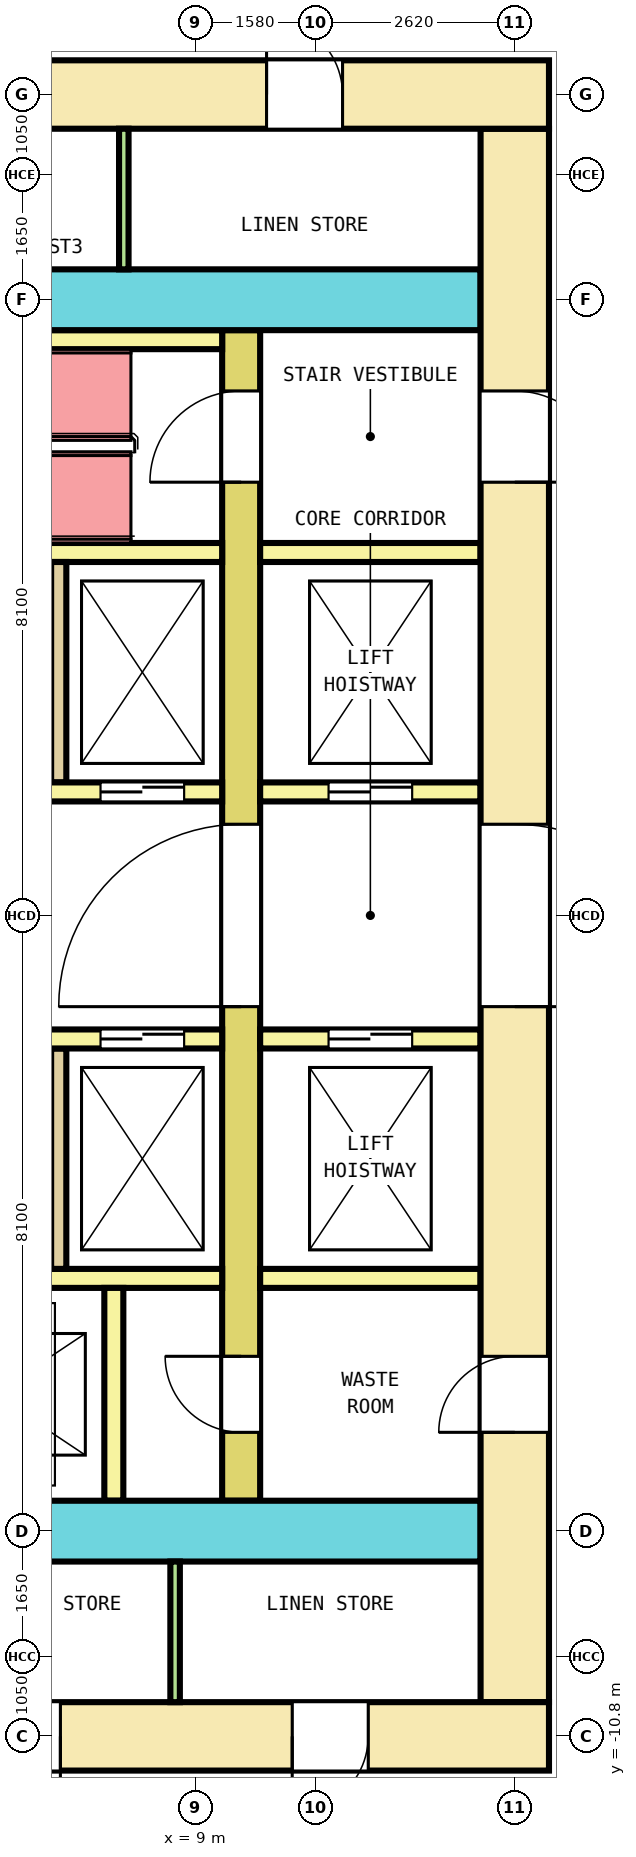
"""IFC4 building model, lengths in metres.
Left out: names, types, materials, properties, quantities, classifications, styles, units other than length and angle.
Written with IfcOpenShell. Run it as: python <this file> out.ifc"""

import sys

from ifc_helpers import new_model, si_unit, direction, frame, frame_2d, origin, place, context, subcontext, project, spatial, rectangle, extrude, element, fill, save


model = new_model("IFC4")
c1 = context("Model", 3, precision=1e-05, world=origin(), true_north=direction((0.0, 1.0)))
c2 = subcontext(c1, "Body", "Model", "MODEL_VIEW")
j1 = project(units=[si_unit("LENGTHUNIT", "METRE"), si_unit("PLANEANGLEUNIT", "RADIAN")], contexts=[c1])
p1 = place(None, origin())
s1 = spatial("IfcSite", under=j1, at=p1, CompositionType="ELEMENT")
p2 = place(p1, origin())
s2 = spatial("IfcBuilding", under=s1, at=p2, CompositionType="ELEMENT")
p3 = place(p2, frame((0.0, 0.0, 67.4)))
s3 = spatial("IfcBuildingStorey", under=s2, at=p3, CompositionType="ELEMENT", Elevation=67.4)
p4 = place(p3, frame((-13.65, 10.8, 0.0), z_axis=(0.0, 0.0, 1.0), x_axis=(1.0, 0.0, 0.0)))
e1 = element("IfcWall", 1, at=p4, inside=s3, PredefinedType="SHEAR", context=c2, shape_type="SweptSolid", body=[
    extrude(rectangle(XDim=27.3, YDim=0.9, at=frame_2d((13.65, 0.0))), origin(), (0.0, 0.0, 1.0), 4.1),
])
p5 = place(p4, frame((3.416, 0.0, 0.0)))
e2 = element("IfcOpeningElement", 2, at=p5, cuts=e1, PredefinedType="OPENING", context=c2, shape_type="SweptSolid", body=[
    extrude(rectangle(XDim=1.0, YDim=2.1, at=frame_2d((0.5, 1.05))), frame((0.0, 0.46, 0.0), z_axis=(0.0, -1.0, 0.0), x_axis=(1.0, 0.0, 0.0)), (0.0, 0.0, 1.0), 0.92),
])
p6 = place(p4, frame((9.541, 0.0, 0.0)))
e3 = element("IfcOpeningElement", 3, at=p6, cuts=e1, PredefinedType="OPENING", context=c2, shape_type="SweptSolid", body=[
    extrude(rectangle(XDim=1.0, YDim=2.1, at=frame_2d((0.5, 1.05))), frame((0.0, 0.46, 0.0), z_axis=(0.0, -1.0, 0.0), x_axis=(1.0, 0.0, 0.0)), (0.0, 0.0, 1.0), 0.92),
])
p7 = place(p4, frame((18.859, 0.0, 0.0)))
e4 = element("IfcOpeningElement", 4, at=p7, cuts=e1, PredefinedType="OPENING", context=c2, shape_type="SweptSolid", body=[
    extrude(rectangle(XDim=1.0, YDim=2.1, at=frame_2d((0.5, 1.05))), frame((0.0, 0.46, 0.0), z_axis=(0.0, -1.0, 0.0), x_axis=(1.0, 0.0, 0.0)), (0.0, 0.0, 1.0), 0.92),
])
p8 = place(p4, frame((23.584, 0.0, 0.0)))
e5 = element("IfcOpeningElement", 5, at=p8, cuts=e1, PredefinedType="OPENING", context=c2, shape_type="SweptSolid", body=[
    extrude(rectangle(XDim=1.0, YDim=2.1, at=frame_2d((0.5, 1.05))), frame((0.0, 0.46, 0.0), z_axis=(0.0, -1.0, 0.0), x_axis=(1.0, 0.0, 0.0)), (0.0, 0.0, 1.0), 0.92),
])
p9 = place(p4, frame((14.575, 0.0, 0.0)))
e6 = element("IfcOpeningElement", 6, at=p9, cuts=e1, PredefinedType="OPENING", context=c2, shape_type="SweptSolid", body=[
    extrude(rectangle(XDim=1.4, YDim=2.1, at=frame_2d((0.7, 1.05))), frame((0.0, 0.46, 0.0), z_axis=(0.0, -1.0, 0.0), x_axis=(1.0, 0.0, 0.0)), (0.0, 0.0, 1.0), 0.92),
])
p10 = place(p3, frame((-13.65, -10.8, 0.0), z_axis=(0.0, 0.0, 1.0), x_axis=(1.0, 0.0, 0.0)))
e7 = element("IfcWall", 7, at=p10, inside=s3, PredefinedType="SHEAR", context=c2, shape_type="SweptSolid", body=[
    extrude(rectangle(XDim=27.3, YDim=0.9, at=frame_2d((13.65, 0.0))), origin(), (0.0, 0.0, 1.0), 4.1),
])
p11 = place(p10, frame((2.425, 0.0, 0.0)))
e8 = element("IfcOpeningElement", 8, at=p11, cuts=e7, PredefinedType="OPENING", context=c2, shape_type="SweptSolid", body=[
    extrude(rectangle(XDim=1.0, YDim=2.1, at=frame_2d((0.5, 1.05))), frame((0.0, 0.46, 0.0), z_axis=(0.0, -1.0, 0.0), x_axis=(1.0, 0.0, 0.0)), (0.0, 0.0, 1.0), 0.92),
])
p12 = place(p10, frame((6.569, 0.0, 0.0)))
e9 = element("IfcOpeningElement", 9, at=p12, cuts=e7, PredefinedType="OPENING", context=c2, shape_type="SweptSolid", body=[
    extrude(rectangle(XDim=1.0, YDim=2.1, at=frame_2d((0.5, 1.05))), frame((0.0, 0.46, 0.0), z_axis=(0.0, -1.0, 0.0), x_axis=(1.0, 0.0, 0.0)), (0.0, 0.0, 1.0), 0.92),
])
p13 = place(p10, frame((10.681, 0.0, 0.0)))
e10 = element("IfcOpeningElement", 10, at=p13, cuts=e7, PredefinedType="OPENING", context=c2, shape_type="SweptSolid", body=[
    extrude(rectangle(XDim=1.0, YDim=2.1, at=frame_2d((0.5, 1.05))), frame((0.0, 0.46, 0.0), z_axis=(0.0, -1.0, 0.0), x_axis=(1.0, 0.0, 0.0)), (0.0, 0.0, 1.0), 0.92),
])
p14 = place(p10, frame((19.872, 0.0, 0.0)))
e11 = element("IfcOpeningElement", 11, at=p14, cuts=e7, PredefinedType="OPENING", context=c2, shape_type="SweptSolid", body=[
    extrude(rectangle(XDim=1.0, YDim=2.1, at=frame_2d((0.5, 1.05))), frame((0.0, 0.46, 0.0), z_axis=(0.0, -1.0, 0.0), x_axis=(1.0, 0.0, 0.0)), (0.0, 0.0, 1.0), 0.92),
])
p15 = place(p10, frame((23.922, 0.0, 0.0)))
e12 = element("IfcOpeningElement", 12, at=p15, cuts=e7, PredefinedType="OPENING", context=c2, shape_type="SweptSolid", body=[
    extrude(rectangle(XDim=1.0, YDim=2.1, at=frame_2d((0.5, 1.05))), frame((0.0, 0.46, 0.0), z_axis=(0.0, -1.0, 0.0), x_axis=(1.0, 0.0, 0.0)), (0.0, 0.0, 1.0), 0.92),
])
p16 = place(p10, frame((15.2, 0.0, 0.0)))
e13 = element("IfcOpeningElement", 13, at=p16, cuts=e7, PredefinedType="OPENING", context=c2, shape_type="SweptSolid", body=[
    extrude(rectangle(XDim=1.2, YDim=2.1, at=frame_2d((0.6, 1.05))), frame((0.0, 0.46, 0.0), z_axis=(0.0, -1.0, 0.0), x_axis=(1.0, 0.0, 0.0)), (0.0, 0.0, 1.0), 0.92),
])
p17 = place(p3, frame((13.2, -10.35, 0.0), z_axis=(0.0, 0.0, 1.0), x_axis=(0.0, 1.0, 0.0)))
e14 = element("IfcWall", 14, at=p17, inside=s3, PredefinedType="SHEAR", context=c2, shape_type="SweptSolid", body=[
    extrude(rectangle(XDim=20.7, YDim=0.9, at=frame_2d((10.35, 0.0))), origin(), (0.0, 0.0, 1.0), 4.1),
])
p18 = place(p17, frame((9.15, 0.0, 0.0)))
e15 = element("IfcOpeningElement", 15, at=p18, cuts=e14, PredefinedType="OPENING", context=c2, shape_type="SweptSolid", body=[
    extrude(rectangle(XDim=2.4, YDim=2.1, at=frame_2d((1.2, 1.05))), frame((0.0, 0.46, 0.0), z_axis=(0.0, -1.0, 0.0), x_axis=(1.0, 0.0, 0.0)), (0.0, 0.0, 1.0), 0.92),
])
p19 = place(p17, frame((16.05, 0.0, 0.0)))
e16 = element("IfcOpeningElement", 16, at=p19, cuts=e14, PredefinedType="OPENING", context=c2, shape_type="SweptSolid", body=[
    extrude(rectangle(XDim=1.2, YDim=2.1, at=frame_2d((0.6, 1.05))), frame((0.0, 0.46, 0.0), z_axis=(0.0, -1.0, 0.0), x_axis=(1.0, 0.0, 0.0)), (0.0, 0.0, 1.0), 0.92),
])
p20 = place(p17, frame((3.55, 0.0, 0.0)))
e17 = element("IfcOpeningElement", 17, at=p20, cuts=e14, PredefinedType="OPENING", context=c2, shape_type="SweptSolid", body=[
    extrude(rectangle(XDim=1.0, YDim=2.1, at=frame_2d((0.5, 1.05))), frame((0.0, 0.46, 0.0), z_axis=(0.0, -1.0, 0.0), x_axis=(1.0, 0.0, 0.0)), (0.0, 0.0, 1.0), 0.92),
])
p21 = place(p3, frame((-12.75, 8.1, 0.0), z_axis=(0.0, 0.0, 1.0), x_axis=(1.0, 0.0, 0.0)))
e18 = element("IfcWall", 18, at=p21, inside=s3, PredefinedType="SHEAR", context=c2, shape_type="SweptSolid", body=[
    extrude(rectangle(XDim=25.5, YDim=0.8, at=frame_2d((12.75, 0.0))), origin(), (0.0, 0.0, 1.0), 4.1),
])
p22 = place(p21, frame((13.675, 0.0, 0.0)))
e19 = element("IfcOpeningElement", 19, at=p22, cuts=e18, PredefinedType="OPENING", context=c2, shape_type="SweptSolid", body=[
    extrude(rectangle(XDim=1.4, YDim=2.1, at=frame_2d((0.7, 1.05))), frame((0.0, 0.41, 0.0), z_axis=(0.0, -1.0, 0.0), x_axis=(1.0, 0.0, 0.0)), (0.0, 0.0, 1.0), 0.82),
])
p23 = place(p3, frame((-12.75, -8.1, 0.0), z_axis=(0.0, 0.0, 1.0), x_axis=(1.0, 0.0, 0.0)))
e20 = element("IfcWall", 20, at=p23, inside=s3, PredefinedType="SHEAR", context=c2, shape_type="SweptSolid", body=[
    extrude(rectangle(XDim=25.5, YDim=0.8, at=frame_2d((12.75, 0.0))), origin(), (0.0, 0.0, 1.0), 4.1),
])
p24 = place(p23, frame((14.3, 0.0, 0.0)))
e21 = element("IfcOpeningElement", 21, at=p24, cuts=e20, PredefinedType="OPENING", context=c2, shape_type="SweptSolid", body=[
    extrude(rectangle(XDim=1.2, YDim=2.1, at=frame_2d((0.6, 1.05))), frame((0.0, 0.41, 0.0), z_axis=(0.0, -1.0, 0.0), x_axis=(1.0, 0.0, 0.0)), (0.0, 0.0, 1.0), 0.82),
])
p25 = place(p3, frame((9.6, -7.7, 0.0), z_axis=(0.0, 0.0, 1.0), x_axis=(0.0, 1.0, 0.0)))
e22 = element("IfcWall", 22, at=p25, inside=s3, PredefinedType="SHEAR", context=c2, shape_type="SweptSolid", body=[
    extrude(rectangle(XDim=15.4, YDim=0.5, at=frame_2d((7.7, 0.0))), origin(), (0.0, 0.0, 1.0), 4.1),
])
p26 = place(p25, frame((6.5, 0.0, 0.0)))
e23 = element("IfcOpeningElement", 23, at=p26, cuts=e22, PredefinedType="OPENING", context=c2, shape_type="SweptSolid", body=[
    extrude(rectangle(XDim=2.4, YDim=2.1, at=frame_2d((1.2, 1.05))), frame((0.0, 0.26, 0.0), z_axis=(0.0, -1.0, 0.0), x_axis=(1.0, 0.0, 0.0)), (0.0, 0.0, 1.0), 0.52),
])
p27 = place(p25, frame((13.4, 0.0, 0.0)))
e24 = element("IfcOpeningElement", 24, at=p27, cuts=e22, PredefinedType="OPENING", context=c2, shape_type="SweptSolid", body=[
    extrude(rectangle(XDim=1.2, YDim=2.1, at=frame_2d((0.6, 1.05))), frame((0.0, 0.26, 0.0), z_axis=(0.0, -1.0, 0.0), x_axis=(1.0, 0.0, 0.0)), (0.0, 0.0, 1.0), 0.52),
])
p28 = place(p25, frame((0.9, 0.0, 0.0)))
e25 = element("IfcOpeningElement", 25, at=p28, cuts=e22, PredefinedType="OPENING", context=c2, shape_type="SweptSolid", body=[
    extrude(rectangle(XDim=1.0, YDim=2.1, at=frame_2d((0.5, 1.05))), frame((0.0, 0.26, 0.0), z_axis=(0.0, -1.0, 0.0), x_axis=(1.0, 0.0, 0.0)), (0.0, 0.0, 1.0), 0.52),
])
p29 = place(p3, frame((-9.35, 1.625, 0.0), z_axis=(0.0, 0.0, 1.0), x_axis=(1.0, 0.0, 0.0)))
e26 = element("IfcWall", 26, at=p29, inside=s3, PredefinedType="SOLIDWALL", context=c2, shape_type="SweptSolid", body=[
    extrude(rectangle(XDim=18.7, YDim=0.25, at=frame_2d((9.35, 0.0))), origin(), (0.0, 0.0, 1.0), 4.1),
])
p30 = place(p29, frame((0.5, 0.0, 0.0)))
e27 = element("IfcOpeningElement", 27, at=p30, cuts=e26, PredefinedType="OPENING", context=c2, shape_type="SweptSolid", body=[
    extrude(rectangle(XDim=1.1, YDim=2.1, at=frame_2d((0.55, 1.05))), frame((0.0, 0.135, 0.0), z_axis=(0.0, -1.0, 0.0), x_axis=(1.0, 0.0, 0.0)), (0.0, 0.0, 1.0), 0.27),
])
p31 = place(p29, frame((17.1, 0.0, 0.0)))
e28 = element("IfcOpeningElement", 28, at=p31, cuts=e26, PredefinedType="OPENING", context=c2, shape_type="SweptSolid", body=[
    extrude(rectangle(XDim=1.1, YDim=2.1, at=frame_2d((0.55, 1.05))), frame((0.0, 0.135, 0.0), z_axis=(0.0, -1.0, 0.0), x_axis=(1.0, 0.0, 0.0)), (0.0, 0.0, 1.0), 0.27),
])
p32 = place(p3, frame((9.85, 1.625, 0.0), z_axis=(0.0, 0.0, 1.0), x_axis=(1.0, 0.0, 0.0)))
e29 = element("IfcWall", 29, at=p32, inside=s3, PredefinedType="SOLIDWALL", context=c2, shape_type="SweptSolid", body=[
    extrude(rectangle(XDim=2.9, YDim=0.25, at=frame_2d((1.45, 0.0))), origin(), (0.0, 0.0, 1.0), 4.1),
])
p33 = place(p32, frame((0.9, 0.0, 0.0)))
e30 = element("IfcOpeningElement", 30, at=p33, cuts=e29, PredefinedType="OPENING", context=c2, shape_type="SweptSolid", body=[
    extrude(rectangle(XDim=1.1, YDim=2.1, at=frame_2d((0.55, 1.05))), frame((0.0, 0.135, 0.0), z_axis=(0.0, -1.0, 0.0), x_axis=(1.0, 0.0, 0.0)), (0.0, 0.0, 1.0), 0.27),
])
p34 = place(p3, frame((-9.35, 4.775, 0.0), z_axis=(0.0, 0.0, 1.0), x_axis=(1.0, 0.0, 0.0)))
e31 = element("IfcWall", 31, at=p34, inside=s3, PredefinedType="SOLIDWALL", context=c2, shape_type="SweptSolid", body=[
    extrude(rectangle(XDim=18.7, YDim=0.25, at=frame_2d((9.35, 0.0))), origin(), (0.0, 0.0, 1.0), 4.1),
])
p35 = place(p3, frame((9.85, 4.775, 0.0), z_axis=(0.0, 0.0, 1.0), x_axis=(1.0, 0.0, 0.0)))
e32 = element("IfcWall", 32, at=p35, inside=s3, PredefinedType="SOLIDWALL", context=c2, shape_type="SweptSolid", body=[
    extrude(rectangle(XDim=2.9, YDim=0.25, at=frame_2d((1.45, 0.0))), origin(), (0.0, 0.0, 1.0), 4.1),
])
p36 = place(p3, frame((7.2, 1.75, 0.0), z_axis=(0.0, 0.0, 1.0), x_axis=(0.0, 1.0, 0.0)))
e33 = element("IfcWall", 33, at=p36, inside=s3, PredefinedType="SOLIDWALL", context=c2, shape_type="SweptSolid", body=[
    extrude(rectangle(XDim=2.9, YDim=0.2, at=frame_2d((1.45, 0.0))), origin(), (0.0, 0.0, 1.0), 4.1),
])
p37 = place(p3, frame((-9.35, -1.625, 0.0), z_axis=(0.0, 0.0, 1.0), x_axis=(1.0, 0.0, 0.0)))
e34 = element("IfcWall", 34, at=p37, inside=s3, PredefinedType="SOLIDWALL", context=c2, shape_type="SweptSolid", body=[
    extrude(rectangle(XDim=18.7, YDim=0.25, at=frame_2d((9.35, 0.0))), origin(), (0.0, 0.0, 1.0), 4.1),
])
p38 = place(p37, frame((0.5, 0.0, 0.0)))
e35 = element("IfcOpeningElement", 35, at=p38, cuts=e34, PredefinedType="OPENING", context=c2, shape_type="SweptSolid", body=[
    extrude(rectangle(XDim=1.1, YDim=2.1, at=frame_2d((0.55, 1.05))), frame((0.0, 0.135, 0.0), z_axis=(0.0, -1.0, 0.0), x_axis=(1.0, 0.0, 0.0)), (0.0, 0.0, 1.0), 0.27),
])
p39 = place(p37, frame((17.1, 0.0, 0.0)))
e36 = element("IfcOpeningElement", 36, at=p39, cuts=e34, PredefinedType="OPENING", context=c2, shape_type="SweptSolid", body=[
    extrude(rectangle(XDim=1.1, YDim=2.1, at=frame_2d((0.55, 1.05))), frame((0.0, 0.135, 0.0), z_axis=(0.0, -1.0, 0.0), x_axis=(1.0, 0.0, 0.0)), (0.0, 0.0, 1.0), 0.27),
])
p40 = place(p3, frame((9.85, -1.625, 0.0), z_axis=(0.0, 0.0, 1.0), x_axis=(1.0, 0.0, 0.0)))
e37 = element("IfcWall", 37, at=p40, inside=s3, PredefinedType="SOLIDWALL", context=c2, shape_type="SweptSolid", body=[
    extrude(rectangle(XDim=2.9, YDim=0.25, at=frame_2d((1.45, 0.0))), origin(), (0.0, 0.0, 1.0), 4.1),
])
p41 = place(p40, frame((0.9, 0.0, 0.0)))
e38 = element("IfcOpeningElement", 38, at=p41, cuts=e37, PredefinedType="OPENING", context=c2, shape_type="SweptSolid", body=[
    extrude(rectangle(XDim=1.1, YDim=2.1, at=frame_2d((0.55, 1.05))), frame((0.0, 0.135, 0.0), z_axis=(0.0, -1.0, 0.0), x_axis=(1.0, 0.0, 0.0)), (0.0, 0.0, 1.0), 0.27),
])
p42 = place(p3, frame((-9.35, -4.775, 0.0), z_axis=(0.0, 0.0, 1.0), x_axis=(1.0, 0.0, 0.0)))
e39 = element("IfcWall", 39, at=p42, inside=s3, PredefinedType="SOLIDWALL", context=c2, shape_type="SweptSolid", body=[
    extrude(rectangle(XDim=18.7, YDim=0.25, at=frame_2d((9.35, 0.0))), origin(), (0.0, 0.0, 1.0), 4.1),
])
p43 = place(p3, frame((9.85, -4.775, 0.0), z_axis=(0.0, 0.0, 1.0), x_axis=(1.0, 0.0, 0.0)))
e40 = element("IfcWall", 40, at=p43, inside=s3, PredefinedType="SOLIDWALL", context=c2, shape_type="SweptSolid", body=[
    extrude(rectangle(XDim=2.9, YDim=0.25, at=frame_2d((1.45, 0.0))), origin(), (0.0, 0.0, 1.0), 4.1),
])
p44 = place(p3, frame((7.2, -4.65, 0.0), z_axis=(0.0, 0.0, 1.0), x_axis=(0.0, 1.0, 0.0)))
e41 = element("IfcWall", 41, at=p44, inside=s3, PredefinedType="SOLIDWALL", context=c2, shape_type="SweptSolid", body=[
    extrude(rectangle(XDim=2.9, YDim=0.2, at=frame_2d((1.45, 0.0))), origin(), (0.0, 0.0, 1.0), 4.1),
])
p45 = place(p3, frame((3.55, 7.575, 0.0), z_axis=(0.0, 0.0, 1.0), x_axis=(1.0, 0.0, 0.0)))
e42 = element("IfcWall", 42, at=p45, inside=s3, PredefinedType="SOLIDWALL", context=c2, shape_type="SweptSolid", body=[
    extrude(rectangle(XDim=5.8, YDim=0.25, at=frame_2d((2.9, 0.0))), origin(), (0.0, 0.0, 1.0), 4.1),
])
p46 = place(p3, frame((7.925, -7.7, 0.0), z_axis=(0.0, 0.0, 1.0), x_axis=(0.0, 1.0, 0.0)))
e43 = element("IfcWall", 43, at=p46, inside=s3, PredefinedType="SOLIDWALL", context=c2, shape_type="SweptSolid", body=[
    extrude(rectangle(XDim=2.8, YDim=0.25, at=frame_2d((1.4, 0.0))), origin(), (0.0, 0.0, 1.0), 4.1),
])
for number, where, z_axis, x_axis in (
    (44, (8.056, 8.5, 0.0), (0.0, 0.0, 1.0), (0.0, 1.0, 0.0)),
    (45, (8.731, -10.35, 0.0), (0.0, 0.0, 1.0), (0.0, 1.0, 0.0)),
):
    element("IfcWall", number, at=place(p3, frame(where, z_axis=z_axis, x_axis=x_axis)), inside=s3, PredefinedType="PARTITIONING", context=c2, shape_type="SweptSolid", body=[
        extrude(rectangle(XDim=1.85, YDim=0.125, at=frame_2d((0.925, 0.0))), origin(), (0.0, 0.0, 1.0), 4.1),
    ])
p47 = place(p31, origin())
e46 = element("IfcDoor", 46, at=p47, inside=s3, OperationType="DOUBLE_DOOR_SLIDING", PredefinedType="DOOR", context=c2, shape_type="SweptSolid", body=[
    extrude(rectangle(XDim=1.1, YDim=2.1, at=frame_2d((0.55, 1.05))), frame((0.0, 0.075, 0.0), z_axis=(0.0, -1.0, 0.0), x_axis=(1.0, 0.0, 0.0)), (0.0, 0.0, 1.0), 0.15),
])
fill(e28, e46)
p48 = place(p33, origin())
e47 = element("IfcDoor", 47, at=p48, inside=s3, OperationType="DOUBLE_DOOR_SLIDING", PredefinedType="DOOR", context=c2, shape_type="SweptSolid", body=[
    extrude(rectangle(XDim=1.1, YDim=2.1, at=frame_2d((0.55, 1.05))), frame((0.0, 0.075, 0.0), z_axis=(0.0, -1.0, 0.0), x_axis=(1.0, 0.0, 0.0)), (0.0, 0.0, 1.0), 0.15),
])
fill(e30, e47)
p49 = place(p39, origin())
e48 = element("IfcDoor", 48, at=p49, inside=s3, OperationType="DOUBLE_DOOR_SLIDING", PredefinedType="DOOR", context=c2, shape_type="SweptSolid", body=[
    extrude(rectangle(XDim=1.1, YDim=2.1, at=frame_2d((0.55, 1.05))), frame((0.0, 0.075, 0.0), z_axis=(0.0, -1.0, 0.0), x_axis=(1.0, 0.0, 0.0)), (0.0, 0.0, 1.0), 0.15),
])
fill(e36, e48)
p50 = place(p41, origin())
e49 = element("IfcDoor", 49, at=p50, inside=s3, OperationType="DOUBLE_DOOR_SLIDING", PredefinedType="DOOR", context=c2, shape_type="SweptSolid", body=[
    extrude(rectangle(XDim=1.1, YDim=2.1, at=frame_2d((0.55, 1.05))), frame((0.0, 0.075, 0.0), z_axis=(0.0, -1.0, 0.0), x_axis=(1.0, 0.0, 0.0)), (0.0, 0.0, 1.0), 0.15),
])
fill(e38, e49)
p51 = place(p26, origin())
e50 = element("IfcDoor", 50, at=p51, inside=s3, OperationType="DOUBLE_DOOR_SINGLE_SWING", PredefinedType="DOOR", context=c2, shape_type="SweptSolid", body=[
    extrude(rectangle(XDim=2.4, YDim=2.1, at=frame_2d((1.2, 1.05))), frame((0.0, 0.2, 0.0), z_axis=(0.0, -1.0, 0.0), x_axis=(1.0, 0.0, 0.0)), (0.0, 0.0, 1.0), 0.4),
])
fill(e23, e50)
p52 = place(p18, origin())
e51 = element("IfcDoor", 51, at=p52, inside=s3, OperationType="DOUBLE_DOOR_SINGLE_SWING", PredefinedType="DOOR", context=c2, shape_type="SweptSolid", body=[
    extrude(rectangle(XDim=2.4, YDim=2.1, at=frame_2d((1.2, 1.05))), frame((0.0, 0.3, 0.0), z_axis=(0.0, -1.0, 0.0), x_axis=(1.0, 0.0, 0.0)), (0.0, 0.0, 1.0), 0.6),
])
fill(e15, e51)
p53 = place(p27, origin())
e52 = element("IfcDoor", 52, at=p53, inside=s3, OperationType="SINGLE_SWING_LEFT", PredefinedType="DOOR", context=c2, shape_type="SweptSolid", body=[
    extrude(rectangle(XDim=1.2, YDim=2.1, at=frame_2d((0.6, 1.05))), frame((0.0, 0.2, 0.0), z_axis=(0.0, -1.0, 0.0), x_axis=(1.0, 0.0, 0.0)), (0.0, 0.0, 1.0), 0.4),
])
fill(e24, e52)
p54 = place(p19, origin())
e53 = element("IfcDoor", 53, at=p54, inside=s3, OperationType="SINGLE_SWING_RIGHT", PredefinedType="DOOR", context=c2, shape_type="SweptSolid", body=[
    extrude(rectangle(XDim=1.2, YDim=2.1, at=frame_2d((0.6, 1.05))), frame((0.0, 0.3, 0.0), z_axis=(0.0, -1.0, 0.0), x_axis=(1.0, 0.0, 0.0)), (0.0, 0.0, 1.0), 0.6),
])
fill(e16, e53)
p55 = place(p28, origin())
e54 = element("IfcDoor", 54, at=p55, inside=s3, OperationType="SINGLE_SWING_LEFT", PredefinedType="DOOR", context=c2, shape_type="SweptSolid", body=[
    extrude(rectangle(XDim=1.0, YDim=2.1, at=frame_2d((0.5, 1.05))), frame((0.0, 0.2, 0.0), z_axis=(0.0, -1.0, 0.0), x_axis=(1.0, 0.0, 0.0)), (0.0, 0.0, 1.0), 0.4),
])
fill(e25, e54)
p56 = place(p20, origin())
e55 = element("IfcDoor", 55, at=p56, inside=s3, OperationType="SINGLE_SWING_RIGHT", PredefinedType="DOOR", context=c2, shape_type="SweptSolid", body=[
    extrude(rectangle(XDim=1.0, YDim=2.1, at=frame_2d((0.5, 1.05))), frame((0.0, 0.3, 0.0), z_axis=(0.0, -1.0, 0.0), x_axis=(1.0, 0.0, 0.0)), (0.0, 0.0, 1.0), 0.6),
])
fill(e17, e55)
p57 = place(p8, origin())
e56 = element("IfcDoor", 56, at=p57, inside=s3, OperationType="SINGLE_SWING_RIGHT", PredefinedType="DOOR", context=c2, shape_type="SweptSolid", body=[
    extrude(rectangle(XDim=1.0, YDim=2.1, at=frame_2d((0.5, 1.05))), frame((0.0, 0.3, 0.0), z_axis=(0.0, -1.0, 0.0), x_axis=(1.0, 0.0, 0.0)), (0.0, 0.0, 1.0), 0.6),
])
fill(e5, e56)
p58 = place(p14, origin())
e57 = element("IfcDoor", 57, at=p58, inside=s3, OperationType="SINGLE_SWING_LEFT", PredefinedType="DOOR", context=c2, shape_type="SweptSolid", body=[
    extrude(rectangle(XDim=1.0, YDim=2.1, at=frame_2d((0.5, 1.05))), frame((0.0, 0.3, 0.0), z_axis=(0.0, -1.0, 0.0), x_axis=(1.0, 0.0, 0.0)), (0.0, 0.0, 1.0), 0.6),
])
fill(e11, e57)
p59 = place(p15, origin())
e58 = element("IfcDoor", 58, at=p59, inside=s3, OperationType="SINGLE_SWING_RIGHT", PredefinedType="DOOR", context=c2, shape_type="SweptSolid", body=[
    extrude(rectangle(XDim=1.0, YDim=2.1, at=frame_2d((0.5, 1.05))), frame((0.0, 0.3, 0.0), z_axis=(0.0, -1.0, 0.0), x_axis=(1.0, 0.0, 0.0)), (0.0, 0.0, 1.0), 0.6),
])
fill(e12, e58)
save(model, sys.argv[1])
